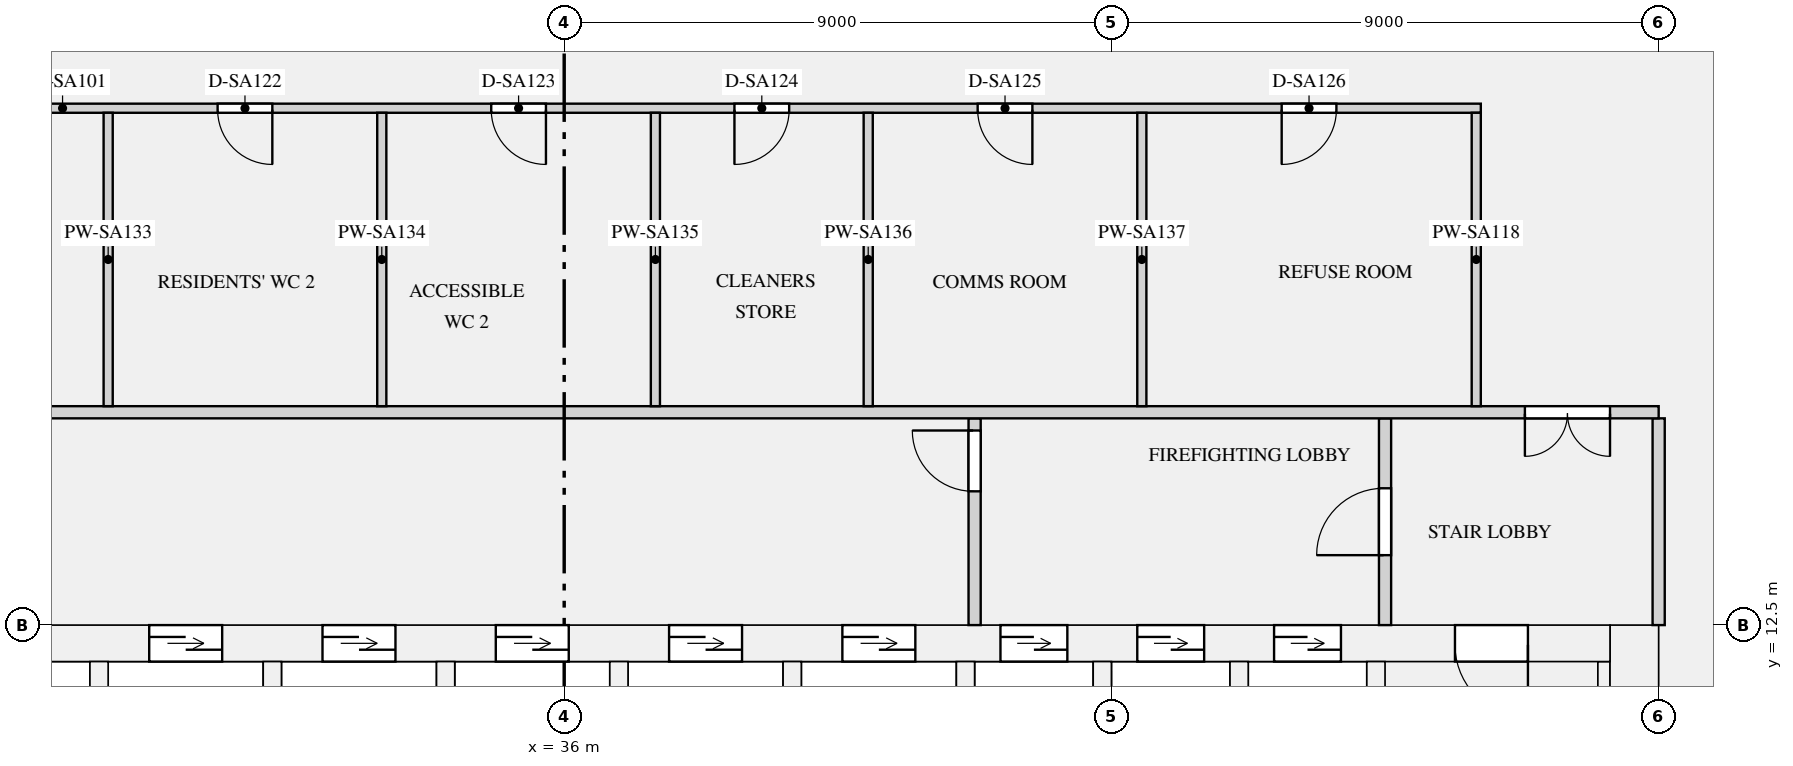
"""IFC4 building model, lengths in metres.
Left out: names, types, materials, properties, quantities, classifications, styles, units other than length and angle.
Written with IfcOpenShell. Run it as: python <this file> out.ifc"""

import sys

from ifc_helpers import new_model, si_unit, direction, frame, frame_2d, origin, place, context, subcontext, project, spatial, rectangle, extrude, element, fill, save


model = new_model("IFC4")
c1 = context("Model", 3, precision=1e-05, world=origin(), true_north=direction((0.0, 1.0)))
c2 = subcontext(c1, "Body", "Model", "MODEL_VIEW")
j1 = project(units=[si_unit("LENGTHUNIT", "METRE"), si_unit("PLANEANGLEUNIT", "RADIAN")], contexts=[c1])
p1 = place(None, origin())
s1 = spatial("IfcSite", under=j1, at=p1, CompositionType="ELEMENT")
p2 = place(p1, origin())
s2 = spatial("IfcBuilding", under=s1, at=p2, CompositionType="ELEMENT")
p3 = place(p2, frame((0.0, 0.0, 77.25)))
s3 = spatial("IfcBuildingStorey", under=s2, at=p3, CompositionType="ELEMENT", Elevation=77.25)
p4 = place(p3, frame((53.6, 0.0, 0.0), z_axis=(0.0, 0.0, 1.0), x_axis=(0.0, 1.0, 0.0)))
e1 = element("IfcWall", 1, at=p4, inside=s3, PredefinedType="SHEAR", context=c2, shape_type="SweptSolid", body=[
    extrude(rectangle(XDim=12.5, YDim=0.8, at=frame_2d((6.25, 0.0))), origin(), (0.0, 0.0, 1.0), 6.3),
])
p5 = place(p3, frame((18.8, 12.2, 0.0), z_axis=(0.0, 0.0, 1.0), x_axis=(1.0, 0.0, 0.0)))
e2 = element("IfcWall", 2, at=p5, inside=s3, PredefinedType="SHEAR", context=c2, shape_type="SweptSolid", body=[
    extrude(rectangle(XDim=34.4, YDim=0.6, at=frame_2d((17.2, 0.0))), origin(), (0.0, 0.0, 1.0), 6.3),
])
p6 = place(p5, frame((4.675, 0.0, 0.0)))
e3 = element("IfcOpeningElement", 3, at=p6, cuts=e2, PredefinedType="OPENING", context=c2, shape_type="SweptSolid", body=[
    extrude(rectangle(XDim=1.2, YDim=2.1, at=frame_2d((0.6, 1.05))), frame((0.0, 0.31, 0.0), z_axis=(0.0, -1.0, 0.0), x_axis=(1.0, 0.0, 0.0)), (0.0, 0.0, 1.0), 0.62),
])
p7 = place(p5, frame((7.525, 0.0, 0.0)))
e4 = element("IfcOpeningElement", 4, at=p7, cuts=e2, PredefinedType="OPENING", context=c2, shape_type="SweptSolid", body=[
    extrude(rectangle(XDim=1.2, YDim=2.1, at=frame_2d((0.6, 1.05))), frame((0.0, 0.31, 0.0), z_axis=(0.0, -1.0, 0.0), x_axis=(1.0, 0.0, 0.0)), (0.0, 0.0, 1.0), 0.62),
])
p8 = place(p5, frame((10.375, 0.0, 0.0)))
e5 = element("IfcOpeningElement", 5, at=p8, cuts=e2, PredefinedType="OPENING", context=c2, shape_type="SweptSolid", body=[
    extrude(rectangle(XDim=1.2, YDim=2.1, at=frame_2d((0.6, 1.05))), frame((0.0, 0.31, 0.0), z_axis=(0.0, -1.0, 0.0), x_axis=(1.0, 0.0, 0.0)), (0.0, 0.0, 1.0), 0.62),
])
p9 = place(p5, frame((13.225, 0.0, 0.0)))
e6 = element("IfcOpeningElement", 6, at=p9, cuts=e2, PredefinedType="OPENING", context=c2, shape_type="SweptSolid", body=[
    extrude(rectangle(XDim=1.2, YDim=2.1, at=frame_2d((0.6, 1.05))), frame((0.0, 0.31, 0.0), z_axis=(0.0, -1.0, 0.0), x_axis=(1.0, 0.0, 0.0)), (0.0, 0.0, 1.0), 0.62),
])
p10 = place(p5, frame((16.075, 0.0, 0.0)))
e7 = element("IfcOpeningElement", 7, at=p10, cuts=e2, PredefinedType="OPENING", context=c2, shape_type="SweptSolid", body=[
    extrude(rectangle(XDim=1.2, YDim=2.1, at=frame_2d((0.6, 1.05))), frame((0.0, 0.31, 0.0), z_axis=(0.0, -1.0, 0.0), x_axis=(1.0, 0.0, 0.0)), (0.0, 0.0, 1.0), 0.62),
])
p11 = place(p5, frame((18.925, 0.0, 0.0)))
e8 = element("IfcOpeningElement", 8, at=p11, cuts=e2, PredefinedType="OPENING", context=c2, shape_type="SweptSolid", body=[
    extrude(rectangle(XDim=1.2, YDim=2.1, at=frame_2d((0.6, 1.05))), frame((0.0, 0.31, 0.0), z_axis=(0.0, -1.0, 0.0), x_axis=(1.0, 0.0, 0.0)), (0.0, 0.0, 1.0), 0.62),
])
p12 = place(p5, frame((21.775, 0.0, 0.0)))
e9 = element("IfcOpeningElement", 9, at=p12, cuts=e2, PredefinedType="OPENING", context=c2, shape_type="SweptSolid", body=[
    extrude(rectangle(XDim=1.2, YDim=2.1, at=frame_2d((0.6, 1.05))), frame((0.0, 0.31, 0.0), z_axis=(0.0, -1.0, 0.0), x_axis=(1.0, 0.0, 0.0)), (0.0, 0.0, 1.0), 0.62),
])
p13 = place(p5, frame((24.375, 0.0, 0.0)))
e10 = element("IfcOpeningElement", 10, at=p13, cuts=e2, PredefinedType="OPENING", context=c2, shape_type="SweptSolid", body=[
    extrude(rectangle(XDim=1.1, YDim=2.1, at=frame_2d((0.55, 1.05))), frame((0.0, 0.31, 0.0), z_axis=(0.0, -1.0, 0.0), x_axis=(1.0, 0.0, 0.0)), (0.0, 0.0, 1.0), 0.62),
])
p14 = place(p5, frame((26.625, 0.0, 0.0)))
e11 = element("IfcOpeningElement", 11, at=p14, cuts=e2, PredefinedType="OPENING", context=c2, shape_type="SweptSolid", body=[
    extrude(rectangle(XDim=1.1, YDim=2.1, at=frame_2d((0.55, 1.05))), frame((0.0, 0.31, 0.0), z_axis=(0.0, -1.0, 0.0), x_axis=(1.0, 0.0, 0.0)), (0.0, 0.0, 1.0), 0.62),
])
p15 = place(p5, frame((28.875, 0.0, 0.0)))
e12 = element("IfcOpeningElement", 12, at=p15, cuts=e2, PredefinedType="OPENING", context=c2, shape_type="SweptSolid", body=[
    extrude(rectangle(XDim=1.1, YDim=2.1, at=frame_2d((0.55, 1.05))), frame((0.0, 0.31, 0.0), z_axis=(0.0, -1.0, 0.0), x_axis=(1.0, 0.0, 0.0)), (0.0, 0.0, 1.0), 0.62),
])
p16 = place(p5, frame((1.35, 0.0, 0.0)))
e13 = element("IfcOpeningElement", 13, at=p16, cuts=e2, PredefinedType="OPENING", context=c2, shape_type="SweptSolid", body=[
    extrude(rectangle(XDim=1.2, YDim=2.1, at=frame_2d((0.6, 1.05))), frame((0.0, 0.31, 0.0), z_axis=(0.0, -1.0, 0.0), x_axis=(1.0, 0.0, 0.0)), (0.0, 0.0, 1.0), 0.62),
])
p17 = place(p5, frame((31.85, 0.0, 0.0)))
e14 = element("IfcOpeningElement", 14, at=p17, cuts=e2, PredefinedType="OPENING", context=c2, shape_type="SweptSolid", body=[
    extrude(rectangle(XDim=1.2, YDim=2.1, at=frame_2d((0.6, 1.05))), frame((0.0, 0.31, 0.0), z_axis=(0.0, -1.0, 0.0), x_axis=(1.0, 0.0, 0.0)), (0.0, 0.0, 1.0), 0.62),
])
p18 = place(p3, frame((53.1, 1.0, 0.0), z_axis=(0.0, 0.0, 1.0), x_axis=(0.0, 1.0, 0.0)))
e15 = element("IfcWall", 15, at=p18, inside=s3, PredefinedType="SHEAR", context=c2, shape_type="SweptSolid", body=[
    extrude(rectangle(XDim=10.9, YDim=0.2, at=frame_2d((5.45, 0.0))), origin(), (0.0, 0.0, 1.0), 6.3),
])
for number, where, z_axis, x_axis in (
    (16, (28.35, 9.35, 0.0), (0.0, 0.0, 1.0), (0.0, 1.0, 0.0)),
    (17, (31.2, 9.35, 0.0), (0.0, 0.0, 1.0), (0.0, 1.0, 0.0)),
    (18, (34.05, 9.35, 0.0), (0.0, 0.0, 1.0), (0.0, 1.0, 0.0)),
    (19, (36.9, 9.35, 0.0), (0.0, 0.0, 1.0), (0.0, 1.0, 0.0)),
    (20, (39.75, 9.35, 0.0), (0.0, 0.0, 1.0), (0.0, 1.0, 0.0)),
):
    element("IfcWall", number, at=place(p3, frame(where, z_axis=z_axis, x_axis=x_axis)), inside=s3, PredefinedType="SHEAR", context=c2, shape_type="SweptSolid", body=[
        extrude(rectangle(XDim=2.55, YDim=0.3, at=frame_2d((1.275, 0.0))), origin(), (0.0, 0.0, 1.0), 6.3),
    ])
for number, where, z_axis, x_axis in (
    (21, (42.6, 8.25, 0.0), (0.0, 0.0, 1.0), (0.0, 1.0, 0.0)),
    (22, (44.85, 8.25, 0.0), (0.0, 0.0, 1.0), (0.0, 1.0, 0.0)),
    (23, (47.1, 8.25, 0.0), (0.0, 0.0, 1.0), (0.0, 1.0, 0.0)),
    (24, (49.35, 8.25, 0.0), (0.0, 0.0, 1.0), (0.0, 1.0, 0.0)),
):
    element("IfcWall", number, at=place(p3, frame(where, z_axis=z_axis, x_axis=x_axis)), inside=s3, PredefinedType="SHEAR", context=c2, shape_type="SweptSolid", body=[
        extrude(rectangle(XDim=3.65, YDim=0.3, at=frame_2d((1.825, 0.0))), origin(), (0.0, 0.0, 1.0), 6.3),
    ])
p19 = place(p3, frame((42.75, 12.5, 0.0), z_axis=(0.0, 0.0, 1.0), x_axis=(0.0, 1.0, 0.0)))
e25 = element("IfcWall", 25, at=p19, inside=s3, PredefinedType="PARTITIONING", context=c2, shape_type="SweptSolid", body=[
    extrude(rectangle(XDim=3.4, YDim=0.2, at=frame_2d((1.7, 0.0))), origin(), (0.0, 0.0, 1.0), 5.98),
])
p20 = place(p19, frame((2.2, 0.0, 0.0)))
e26 = element("IfcOpeningElement", 26, at=p20, cuts=e25, PredefinedType="OPENING", context=c2, shape_type="SweptSolid", body=[
    extrude(rectangle(XDim=1.0, YDim=2.1, at=frame_2d((0.5, 1.05))), frame((0.0, 0.11, 0.0), z_axis=(0.0, -1.0, 0.0), x_axis=(1.0, 0.0, 0.0)), (0.0, 0.0, 1.0), 0.22),
])
p21 = place(p3, frame((49.5, 12.5, 0.0), z_axis=(0.0, 0.0, 1.0), x_axis=(0.0, 1.0, 0.0)))
e27 = element("IfcWall", 27, at=p21, inside=s3, PredefinedType="PARTITIONING", context=c2, shape_type="SweptSolid", body=[
    extrude(rectangle(XDim=3.4, YDim=0.2, at=frame_2d((1.7, 0.0))), origin(), (0.0, 0.0, 1.0), 5.98),
])
p22 = place(p21, frame((1.15, 0.0, 0.0)))
e28 = element("IfcOpeningElement", 28, at=p22, cuts=e27, PredefinedType="OPENING", context=c2, shape_type="SweptSolid", body=[
    extrude(rectangle(XDim=1.1, YDim=2.1, at=frame_2d((0.55, 1.05))), frame((0.0, 0.11, 0.0), z_axis=(0.0, -1.0, 0.0), x_axis=(1.0, 0.0, 0.0)), (0.0, 0.0, 1.0), 0.22),
])
p23 = place(p3, frame((54.0, 12.5, 0.0), z_axis=(0.0, 0.0, 1.0), x_axis=(0.0, 1.0, 0.0)))
e29 = element("IfcWall", 29, at=p23, inside=s3, PredefinedType="PARTITIONING", context=c2, shape_type="SweptSolid", body=[
    extrude(rectangle(XDim=3.4, YDim=0.2, at=frame_2d((1.7, 0.0))), origin(), (0.0, 0.0, 1.0), 5.98),
])
p24 = place(p3, frame((20.925, 21.0, 0.0), z_axis=(0.0, 0.0, 1.0), x_axis=(1.0, 0.0, 0.0)))
e30 = element("IfcWall", 30, at=p24, inside=s3, PredefinedType="PARTITIONING", context=c2, shape_type="SweptSolid", body=[
    extrude(rectangle(XDim=30.15, YDim=0.15, at=frame_2d((15.075, 0.0))), origin(), (0.0, 0.0, 1.0), 5.98),
])
p25 = place(p24, frame((3.375, 0.0, 0.0)))
e31 = element("IfcOpeningElement", 31, at=p25, cuts=e30, PredefinedType="OPENING", context=c2, shape_type="SweptSolid", body=[
    extrude(rectangle(XDim=0.9, YDim=2.1, at=frame_2d((0.45, 1.05))), frame((0.0, 0.085, 0.0), z_axis=(0.0, -1.0, 0.0), x_axis=(1.0, 0.0, 0.0)), (0.0, 0.0, 1.0), 0.17),
])
p26 = place(p24, frame((9.375, 0.0, 0.0)))
e32 = element("IfcOpeningElement", 32, at=p26, cuts=e30, PredefinedType="OPENING", context=c2, shape_type="SweptSolid", body=[
    extrude(rectangle(XDim=0.9, YDim=2.1, at=frame_2d((0.45, 1.05))), frame((0.0, 0.085, 0.0), z_axis=(0.0, -1.0, 0.0), x_axis=(1.0, 0.0, 0.0)), (0.0, 0.0, 1.0), 0.17),
])
p27 = place(p24, frame((13.875, 0.0, 0.0)))
e33 = element("IfcOpeningElement", 33, at=p27, cuts=e30, PredefinedType="OPENING", context=c2, shape_type="SweptSolid", body=[
    extrude(rectangle(XDim=0.9, YDim=2.1, at=frame_2d((0.45, 1.05))), frame((0.0, 0.085, 0.0), z_axis=(0.0, -1.0, 0.0), x_axis=(1.0, 0.0, 0.0)), (0.0, 0.0, 1.0), 0.17),
])
p28 = place(p24, frame((17.875, 0.0, 0.0)))
e34 = element("IfcOpeningElement", 34, at=p28, cuts=e30, PredefinedType="OPENING", context=c2, shape_type="SweptSolid", body=[
    extrude(rectangle(XDim=0.9, YDim=2.1, at=frame_2d((0.45, 1.05))), frame((0.0, 0.085, 0.0), z_axis=(0.0, -1.0, 0.0), x_axis=(1.0, 0.0, 0.0)), (0.0, 0.0, 1.0), 0.17),
])
p29 = place(p24, frame((21.875, 0.0, 0.0)))
e35 = element("IfcOpeningElement", 35, at=p29, cuts=e30, PredefinedType="OPENING", context=c2, shape_type="SweptSolid", body=[
    extrude(rectangle(XDim=0.9, YDim=2.1, at=frame_2d((0.45, 1.05))), frame((0.0, 0.085, 0.0), z_axis=(0.0, -1.0, 0.0), x_axis=(1.0, 0.0, 0.0)), (0.0, 0.0, 1.0), 0.17),
])
p30 = place(p24, frame((26.875, 0.0, 0.0)))
e36 = element("IfcOpeningElement", 36, at=p30, cuts=e30, PredefinedType="OPENING", context=c2, shape_type="SweptSolid", body=[
    extrude(rectangle(XDim=0.9, YDim=2.1, at=frame_2d((0.45, 1.05))), frame((0.0, 0.085, 0.0), z_axis=(0.0, -1.0, 0.0), x_axis=(1.0, 0.0, 0.0)), (0.0, 0.0, 1.0), 0.17),
])
p31 = place(p3, frame((18.0, 16.0, 0.0), z_axis=(0.0, 0.0, 1.0), x_axis=(1.0, 0.0, 0.0)))
e37 = element("IfcWall", 37, at=p31, inside=s3, PredefinedType="PARTITIONING", context=c2, shape_type="SweptSolid", body=[
    extrude(rectangle(XDim=36.0, YDim=0.2, at=frame_2d((18.0, 0.0))), origin(), (0.0, 0.0, 1.0), 5.98),
])
p32 = place(p31, frame((0.8, 0.0, 0.0)))
e38 = element("IfcOpeningElement", 38, at=p32, cuts=e37, PredefinedType="OPENING", context=c2, shape_type="SweptSolid", body=[
    extrude(rectangle(XDim=1.4, YDim=2.1, at=frame_2d((0.7, 1.05))), frame((0.0, 0.11, 0.0), z_axis=(0.0, -1.0, 0.0), x_axis=(1.0, 0.0, 0.0)), (0.0, 0.0, 1.0), 0.22),
])
p33 = place(p31, frame((33.8, 0.0, 0.0)))
e39 = element("IfcOpeningElement", 39, at=p33, cuts=e37, PredefinedType="OPENING", context=c2, shape_type="SweptSolid", body=[
    extrude(rectangle(XDim=1.4, YDim=2.1, at=frame_2d((0.7, 1.05))), frame((0.0, 0.11, 0.0), z_axis=(0.0, -1.0, 0.0), x_axis=(1.0, 0.0, 0.0)), (0.0, 0.0, 1.0), 0.22),
])
for number, where, z_axis, x_axis in (
    (40, (51.0, 16.1, 0.0), (0.0, 0.0, 1.0), (0.0, 1.0, 0.0)),
    (41, (28.5, 16.1, 0.0), (0.0, 0.0, 1.0), (0.0, 1.0, 0.0)),
    (42, (33.0, 16.1, 0.0), (0.0, 0.0, 1.0), (0.0, 1.0, 0.0)),
    (43, (37.5, 16.1, 0.0), (0.0, 0.0, 1.0), (0.0, 1.0, 0.0)),
    (44, (41.0, 16.1, 0.0), (0.0, 0.0, 1.0), (0.0, 1.0, 0.0)),
    (45, (45.5, 16.1, 0.0), (0.0, 0.0, 1.0), (0.0, 1.0, 0.0)),
):
    element("IfcWall", number, at=place(p3, frame(where, z_axis=z_axis, x_axis=x_axis)), inside=s3, PredefinedType="PARTITIONING", context=c2, shape_type="SweptSolid", body=[
        extrude(rectangle(XDim=4.825, YDim=0.15, at=frame_2d((2.413, 0.0))), origin(), (0.0, 0.0, 1.0), 5.98),
    ])
p34 = place(p8, origin())
e46 = element("IfcDoor", 46, at=p34, inside=s3, OperationType="DOUBLE_DOOR_SLIDING", PredefinedType="DOOR", context=c2, shape_type="SweptSolid", body=[
    extrude(rectangle(XDim=1.2, YDim=2.1, at=frame_2d((0.6, 1.05))), frame((0.0, 0.025, 0.0), z_axis=(0.0, -1.0, 0.0), x_axis=(1.0, 0.0, 0.0)), (0.0, 0.0, 1.0), 0.05),
])
fill(e5, e46)
p35 = place(p9, origin())
e47 = element("IfcDoor", 47, at=p35, inside=s3, OperationType="DOUBLE_DOOR_SLIDING", PredefinedType="DOOR", context=c2, shape_type="SweptSolid", body=[
    extrude(rectangle(XDim=1.2, YDim=2.1, at=frame_2d((0.6, 1.05))), frame((0.0, 0.025, 0.0), z_axis=(0.0, -1.0, 0.0), x_axis=(1.0, 0.0, 0.0)), (0.0, 0.0, 1.0), 0.05),
])
fill(e6, e47)
p36 = place(p10, origin())
e48 = element("IfcDoor", 48, at=p36, inside=s3, OperationType="DOUBLE_DOOR_SLIDING", PredefinedType="DOOR", context=c2, shape_type="SweptSolid", body=[
    extrude(rectangle(XDim=1.2, YDim=2.1, at=frame_2d((0.6, 1.05))), frame((0.0, 0.025, 0.0), z_axis=(0.0, -1.0, 0.0), x_axis=(1.0, 0.0, 0.0)), (0.0, 0.0, 1.0), 0.05),
])
fill(e7, e48)
p37 = place(p11, origin())
e49 = element("IfcDoor", 49, at=p37, inside=s3, OperationType="DOUBLE_DOOR_SLIDING", PredefinedType="DOOR", context=c2, shape_type="SweptSolid", body=[
    extrude(rectangle(XDim=1.2, YDim=2.1, at=frame_2d((0.6, 1.05))), frame((0.0, 0.025, 0.0), z_axis=(0.0, -1.0, 0.0), x_axis=(1.0, 0.0, 0.0)), (0.0, 0.0, 1.0), 0.05),
])
fill(e8, e49)
p38 = place(p12, origin())
e50 = element("IfcDoor", 50, at=p38, inside=s3, OperationType="DOUBLE_DOOR_SLIDING", PredefinedType="DOOR", context=c2, shape_type="SweptSolid", body=[
    extrude(rectangle(XDim=1.2, YDim=2.1, at=frame_2d((0.6, 1.05))), frame((0.0, 0.025, 0.0), z_axis=(0.0, -1.0, 0.0), x_axis=(1.0, 0.0, 0.0)), (0.0, 0.0, 1.0), 0.05),
])
fill(e9, e50)
p39 = place(p13, origin())
e51 = element("IfcDoor", 51, at=p39, inside=s3, OperationType="DOUBLE_DOOR_SLIDING", PredefinedType="DOOR", context=c2, shape_type="SweptSolid", body=[
    extrude(rectangle(XDim=1.1, YDim=2.1, at=frame_2d((0.55, 1.05))), frame((0.0, 0.025, 0.0), z_axis=(0.0, -1.0, 0.0), x_axis=(1.0, 0.0, 0.0)), (0.0, 0.0, 1.0), 0.05),
])
fill(e10, e51)
p40 = place(p14, origin())
e52 = element("IfcDoor", 52, at=p40, inside=s3, OperationType="DOUBLE_DOOR_SLIDING", PredefinedType="DOOR", context=c2, shape_type="SweptSolid", body=[
    extrude(rectangle(XDim=1.1, YDim=2.1, at=frame_2d((0.55, 1.05))), frame((0.0, 0.025, 0.0), z_axis=(0.0, -1.0, 0.0), x_axis=(1.0, 0.0, 0.0)), (0.0, 0.0, 1.0), 0.05),
])
fill(e11, e52)
p41 = place(p15, origin())
e53 = element("IfcDoor", 53, at=p41, inside=s3, OperationType="DOUBLE_DOOR_SLIDING", PredefinedType="DOOR", context=c2, shape_type="SweptSolid", body=[
    extrude(rectangle(XDim=1.1, YDim=2.1, at=frame_2d((0.55, 1.05))), frame((0.0, 0.025, 0.0), z_axis=(0.0, -1.0, 0.0), x_axis=(1.0, 0.0, 0.0)), (0.0, 0.0, 1.0), 0.05),
])
fill(e12, e53)
p42 = place(p17, frame((1.2, 0.0, 0.0), z_axis=(0.0, 0.0, 1.0), x_axis=(-1.0, 0.0, 0.0)))
e54 = element("IfcDoor", 54, at=p42, inside=s3, OperationType="SINGLE_SWING_LEFT", PredefinedType="DOOR", context=c2, shape_type="SweptSolid", body=[
    extrude(rectangle(XDim=1.2, YDim=2.1, at=frame_2d((0.6, 1.05))), frame((0.0, 0.025, 0.0), z_axis=(0.0, -1.0, 0.0), x_axis=(1.0, 0.0, 0.0)), (0.0, 0.0, 1.0), 0.05),
])
fill(e14, e54)
p43 = place(p20, origin())
e55 = element("IfcDoor", 55, at=p43, inside=s3, OperationType="SINGLE_SWING_RIGHT", PredefinedType="DOOR", context=c2, shape_type="SweptSolid", body=[
    extrude(rectangle(XDim=1.0, YDim=2.1, at=frame_2d((0.5, 1.05))), frame((0.0, 0.025, 0.0), z_axis=(0.0, -1.0, 0.0), x_axis=(1.0, 0.0, 0.0)), (0.0, 0.0, 1.0), 0.05),
])
fill(e26, e55)
p44 = place(p22, origin())
e56 = element("IfcDoor", 56, at=p44, inside=s3, OperationType="SINGLE_SWING_LEFT", PredefinedType="DOOR", context=c2, shape_type="SweptSolid", body=[
    extrude(rectangle(XDim=1.1, YDim=2.1, at=frame_2d((0.55, 1.05))), frame((0.0, 0.025, 0.0), z_axis=(0.0, -1.0, 0.0), x_axis=(1.0, 0.0, 0.0)), (0.0, 0.0, 1.0), 0.05),
])
fill(e28, e56)
p45 = place(p33, frame((1.4, 0.0, 0.0), z_axis=(0.0, 0.0, 1.0), x_axis=(-1.0, 0.0, 0.0)))
e57 = element("IfcDoor", 57, at=p45, inside=s3, OperationType="DOUBLE_DOOR_SINGLE_SWING", PredefinedType="DOOR", context=c2, shape_type="SweptSolid", body=[
    extrude(rectangle(XDim=1.4, YDim=2.1, at=frame_2d((0.7, 1.05))), frame((0.0, 0.025, 0.0), z_axis=(0.0, -1.0, 0.0), x_axis=(1.0, 0.0, 0.0)), (0.0, 0.0, 1.0), 0.05),
])
fill(e39, e57)
p46 = place(p26, frame((0.9, 0.0, 0.0), z_axis=(0.0, 0.0, 1.0), x_axis=(-1.0, 0.0, 0.0)))
e58 = element("IfcDoor", 58, at=p46, inside=s3, OperationType="SINGLE_SWING_LEFT", PredefinedType="DOOR", context=c2, shape_type="SweptSolid", body=[
    extrude(rectangle(XDim=0.9, YDim=2.1, at=frame_2d((0.45, 1.05))), frame((0.0, 0.025, 0.0), z_axis=(0.0, -1.0, 0.0), x_axis=(1.0, 0.0, 0.0)), (0.0, 0.0, 1.0), 0.05),
])
fill(e32, e58)
p47 = place(p27, frame((0.9, 0.0, 0.0), z_axis=(0.0, 0.0, 1.0), x_axis=(-1.0, 0.0, 0.0)))
e59 = element("IfcDoor", 59, at=p47, inside=s3, OperationType="SINGLE_SWING_LEFT", PredefinedType="DOOR", context=c2, shape_type="SweptSolid", body=[
    extrude(rectangle(XDim=0.9, YDim=2.1, at=frame_2d((0.45, 1.05))), frame((0.0, 0.025, 0.0), z_axis=(0.0, -1.0, 0.0), x_axis=(1.0, 0.0, 0.0)), (0.0, 0.0, 1.0), 0.05),
])
fill(e33, e59)
p48 = place(p28, frame((0.9, 0.0, 0.0), z_axis=(0.0, 0.0, 1.0), x_axis=(-1.0, 0.0, 0.0)))
e60 = element("IfcDoor", 60, at=p48, inside=s3, OperationType="SINGLE_SWING_RIGHT", PredefinedType="DOOR", context=c2, shape_type="SweptSolid", body=[
    extrude(rectangle(XDim=0.9, YDim=2.1, at=frame_2d((0.45, 1.05))), frame((0.0, 0.025, 0.0), z_axis=(0.0, -1.0, 0.0), x_axis=(1.0, 0.0, 0.0)), (0.0, 0.0, 1.0), 0.05),
])
fill(e34, e60)
p49 = place(p29, frame((0.9, 0.0, 0.0), z_axis=(0.0, 0.0, 1.0), x_axis=(-1.0, 0.0, 0.0)))
e61 = element("IfcDoor", 61, at=p49, inside=s3, OperationType="SINGLE_SWING_LEFT", PredefinedType="DOOR", context=c2, shape_type="SweptSolid", body=[
    extrude(rectangle(XDim=0.9, YDim=2.1, at=frame_2d((0.45, 1.05))), frame((0.0, 0.025, 0.0), z_axis=(0.0, -1.0, 0.0), x_axis=(1.0, 0.0, 0.0)), (0.0, 0.0, 1.0), 0.05),
])
fill(e35, e61)
p50 = place(p30, frame((0.9, 0.0, 0.0), z_axis=(0.0, 0.0, 1.0), x_axis=(-1.0, 0.0, 0.0)))
e62 = element("IfcDoor", 62, at=p50, inside=s3, OperationType="SINGLE_SWING_RIGHT", PredefinedType="DOOR", context=c2, shape_type="SweptSolid", body=[
    extrude(rectangle(XDim=0.9, YDim=2.1, at=frame_2d((0.45, 1.05))), frame((0.0, 0.025, 0.0), z_axis=(0.0, -1.0, 0.0), x_axis=(1.0, 0.0, 0.0)), (0.0, 0.0, 1.0), 0.05),
])
fill(e36, e62)
save(model, sys.argv[1])
